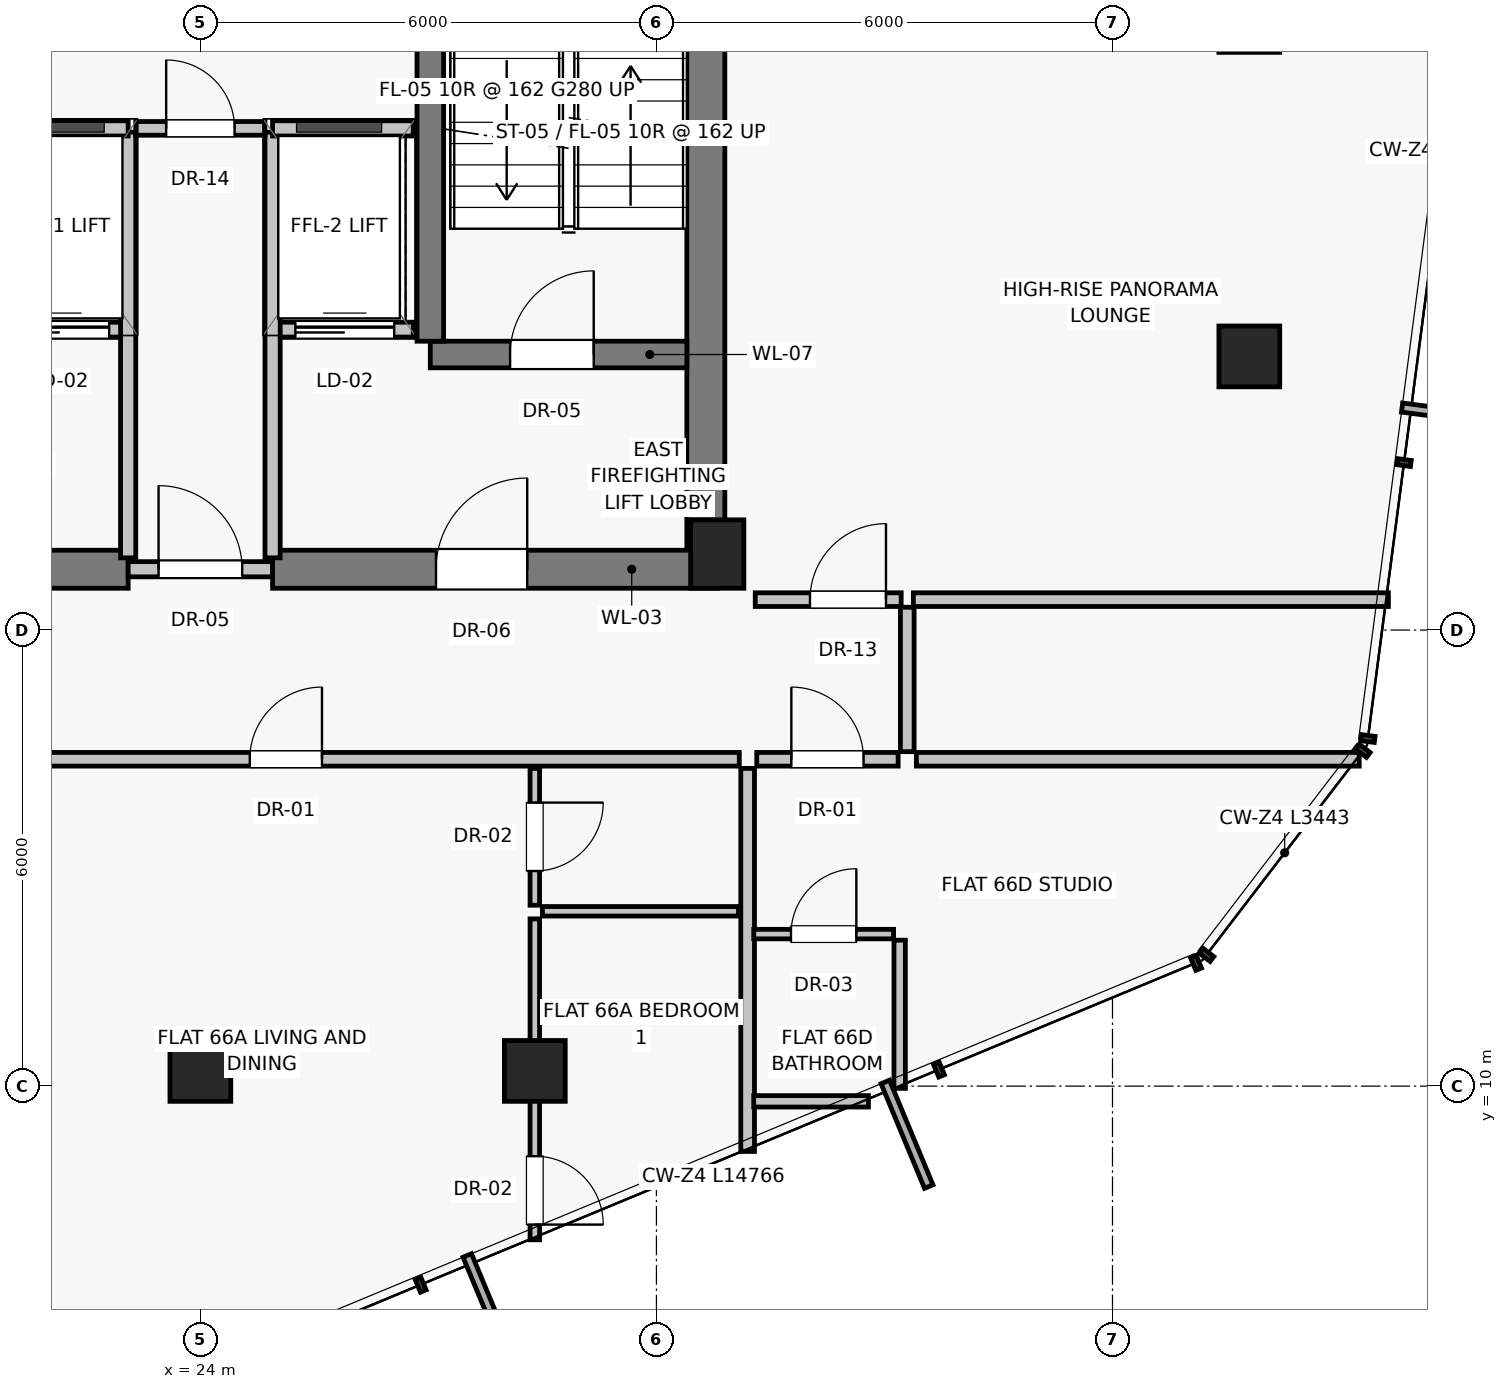
"""IFC4 building model, lengths in metres.
Left out: names, types, materials, properties, quantities, classifications, styles, units other than length and angle.
Written with IfcOpenShell. Run it as: python <this file> out.ifc"""

import sys

from ifc_helpers import new_model, si_unit, direction, frame, frame_2d, origin, origin_2d, place, context, subcontext, project, spatial, rectangle, extrude, source, transform, mapped, element, fill, save


model = new_model("IFC4")
c1 = context("Model", 3, precision=1e-05, world=origin(), true_north=direction((0.0, 1.0)))
c2 = subcontext(c1, "Body", "Model", "MODEL_VIEW")
j1 = project(units=[si_unit("LENGTHUNIT", "METRE"), si_unit("PLANEANGLEUNIT", "RADIAN")], contexts=[c1])
p1 = place(None, origin())
s1 = spatial("IfcSite", under=j1, at=p1, CompositionType="ELEMENT")
p2 = place(p1, origin())
s2 = spatial("IfcBuilding", under=s1, at=p2, CompositionType="ELEMENT")
p3 = place(p2, frame((0.0, 0.0, 233.3)))
s3 = spatial("IfcBuildingStorey", under=s2, at=p3, CompositionType="ELEMENT", Elevation=233.3)
p4 = place(p3, frame((30.8, 17.0, 0.0), z_axis=(0.0, 0.0, 1.0), x_axis=(1.0, 0.0, 0.0)))
e1 = element("IfcColumn", 1, at=p4, inside=s3, PredefinedType="PILASTER", context=c2, shape_type="SweptSolid", body=[
    extrude(rectangle(XDim=0.7, YDim=0.9, at=origin_2d()), origin(), (0.0, 0.0, 1.0), 3.25),
])
for number, where, z_axis, x_axis in (
    (2, (37.8, 19.6, 0.0), (0.0, 0.0, 1.0), (1.0, 0.0, 0.0)),
    (3, (37.8, 24.0, 0.0), (0.0, 0.0, 1.0), (1.0, 0.0, 0.0)),
    (4, (24.0, 10.2, 0.0), (0.0, 0.0, 1.0), (1.0, 0.0, 0.0)),
    (5, (28.4, 10.2, 0.0), (0.0, 0.0, 1.0), (1.0, 0.0, 0.0)),
):
    element("IfcColumn", number, at=place(p3, frame(where, z_axis=z_axis, x_axis=x_axis)), inside=s3, PredefinedType="COLUMN", context=c2, shape_type="SweptSolid", body=[
        extrude(rectangle(XDim=0.8, YDim=0.8, at=origin_2d()), origin(), (0.0, 0.0, 1.0), 3.25),
    ])
p5 = place(p3, frame((30.65, 16.8, 0.0), z_axis=(0.0, 0.0, 1.0), x_axis=(0.0, 1.0, 0.0)))
e6 = element("IfcWall", 6, at=p5, inside=s3, PredefinedType="SHEAR", context=c2, shape_type="SweptSolid", body=[
    extrude(rectangle(XDim=14.2, YDim=0.5, at=frame_2d((7.1, 0.0))), origin(), (0.0, 0.0, 1.0), 3.015),
])
p6 = place(p3, frame((17.2, 16.8, 0.0), z_axis=(0.0, 0.0, 1.0), x_axis=(1.0, 0.0, 0.0)))
e7 = element("IfcWall", 7, at=p6, inside=s3, PredefinedType="SHEAR", context=c2, shape_type="SweptSolid", body=[
    extrude(rectangle(XDim=5.85, YDim=0.5, at=frame_2d((2.925, 0.0))), origin(), (0.0, 0.0, 1.0), 3.015),
])
p7 = place(p6, frame((1.15, 0.0, 0.0)))
e8 = element("IfcOpeningElement", 8, at=p7, cuts=e7, PredefinedType="OPENING", context=c2, shape_type="SweptSolid", body=[
    extrude(rectangle(XDim=1.2, YDim=2.03, at=frame_2d((0.6, 1.015))), frame((0.0, 0.26, 0.0), z_axis=(0.0, -1.0, 0.0), x_axis=(1.0, 0.0, 0.0)), (0.0, 0.0, 1.0), 0.52),
])
p8 = place(p3, frame((23.05, 16.8, 0.0), z_axis=(0.0, 0.0, 1.0), x_axis=(1.0, 0.0, 0.0)))
e9 = element("IfcWall", 9, at=p8, inside=s3, PredefinedType="SOLIDWALL", context=c2, shape_type="SweptSolid", body=[
    extrude(rectangle(XDim=1.9, YDim=0.2, at=frame_2d((0.95, 0.0))), origin(), (0.0, 0.0, 1.0), 2.165),
])
p9 = place(p8, frame((0.4, 0.0, 0.0)))
e10 = element("IfcOpeningElement", 10, at=p9, cuts=e9, PredefinedType="OPENING", context=c2, shape_type="SweptSolid", body=[
    extrude(rectangle(XDim=1.1, YDim=2.03, at=frame_2d((0.55, 1.015))), frame((0.0, 0.11, 0.0), z_axis=(0.0, -1.0, 0.0), x_axis=(1.0, 0.0, 0.0)), (0.0, 0.0, 1.0), 0.22),
])
p10 = place(p3, frame((24.95, 16.8, 0.0), z_axis=(0.0, 0.0, 1.0), x_axis=(1.0, 0.0, 0.0)))
e11 = element("IfcWall", 11, at=p10, inside=s3, PredefinedType="SHEAR", context=c2, shape_type="SweptSolid", body=[
    extrude(rectangle(XDim=5.85, YDim=0.5, at=frame_2d((2.925, 0.0))), origin(), (0.0, 0.0, 1.0), 3.015),
])
p11 = place(p10, frame((2.15, 0.0, 0.0)))
e12 = element("IfcOpeningElement", 12, at=p11, cuts=e11, PredefinedType="OPENING", context=c2, shape_type="SweptSolid", body=[
    extrude(rectangle(XDim=1.2, YDim=2.03, at=frame_2d((0.6, 1.015))), frame((0.0, 0.26, 0.0), z_axis=(0.0, -1.0, 0.0), x_axis=(1.0, 0.0, 0.0)), (0.0, 0.0, 1.0), 0.52),
])
p12 = place(p3, frame((21.2, 19.95, 0.0), z_axis=(0.0, 0.0, 1.0), x_axis=(1.0, 0.0, 0.0)))
e13 = element("IfcWall", 13, at=p12, inside=s3, PredefinedType="SOLIDWALL", context=c2, shape_type="SweptSolid", body=[
    extrude(rectangle(XDim=1.85, YDim=0.2, at=frame_2d((0.925, 0.0))), origin(), (0.0, 0.0, 1.0), 3.015),
])
p13 = place(p12, frame((0.3, 0.0, 0.0)))
e14 = element("IfcOpeningElement", 14, at=p13, cuts=e13, PredefinedType="OPENING", context=c2, shape_type="SweptSolid", body=[
    extrude(rectangle(XDim=1.3, YDim=2.25, at=frame_2d((0.65, 1.125))), frame((0.0, 0.11, 0.0), z_axis=(0.0, -1.0, 0.0), x_axis=(1.0, 0.0, 0.0)), (0.0, 0.0, 1.0), 0.22),
])
p14 = place(p3, frame((24.95, 19.95, 0.0), z_axis=(0.0, 0.0, 1.0), x_axis=(1.0, 0.0, 0.0)))
e15 = element("IfcWall", 15, at=p14, inside=s3, PredefinedType="SOLIDWALL", context=c2, shape_type="SweptSolid", body=[
    extrude(rectangle(XDim=1.85, YDim=0.2, at=frame_2d((0.925, 0.0))), origin(), (0.0, 0.0, 1.0), 3.015),
])
p15 = place(p14, frame((0.3, 0.0, 0.0)))
e16 = element("IfcOpeningElement", 16, at=p15, cuts=e15, PredefinedType="OPENING", context=c2, shape_type="SweptSolid", body=[
    extrude(rectangle(XDim=1.3, YDim=2.25, at=frame_2d((0.65, 1.125))), frame((0.0, 0.11, 0.0), z_axis=(0.0, -1.0, 0.0), x_axis=(1.0, 0.0, 0.0)), (0.0, 0.0, 1.0), 0.22),
])
p16 = place(p3, frame((27.025, 19.625, 0.0), z_axis=(0.0, 0.0, 1.0), x_axis=(1.0, 0.0, 0.0)))
e17 = element("IfcWall", 17, at=p16, inside=s3, PredefinedType="SHEAR", context=c2, shape_type="SweptSolid", body=[
    extrude(rectangle(XDim=3.375, YDim=0.35, at=frame_2d((1.688, 0.0))), origin(), (0.0, 0.0, 1.0), 3.015),
])
p17 = place(p16, frame((1.05, 0.0, 0.0)))
e18 = element("IfcOpeningElement", 18, at=p17, cuts=e17, PredefinedType="OPENING", context=c2, shape_type="SweptSolid", body=[
    extrude(rectangle(XDim=1.1, YDim=2.03, at=frame_2d((0.55, 1.015))), frame((0.0, 0.185, 0.0), z_axis=(0.0, -1.0, 0.0), x_axis=(1.0, 0.0, 0.0)), (0.0, 0.0, 1.0), 0.37),
])
p18 = place(p3, frame((27.025, 19.8, 0.0), z_axis=(0.0, 0.0, 1.0), x_axis=(0.0, 1.0, 0.0)))
e19 = element("IfcWall", 19, at=p18, inside=s3, PredefinedType="SHEAR", context=c2, shape_type="SweptSolid", body=[
    extrude(rectangle(XDim=8.775, YDim=0.35, at=frame_2d((4.387, 0.0))), origin(), (0.0, 0.0, 1.0), 3.015),
])
for number, where, z_axis, x_axis in (
    (20, (23.05, 16.95, 0.0), (0.0, 0.0, 1.0), (0.0, 1.0, 0.0)),
    (21, (24.95, 16.95, 0.0), (0.0, 0.0, 1.0), (0.0, 1.0, 0.0)),
):
    element("IfcWall", number, at=place(p3, frame(where, z_axis=z_axis, x_axis=x_axis)), inside=s3, PredefinedType="SOLIDWALL", context=c2, shape_type="SweptSolid", body=[
        extrude(rectangle(XDim=5.6, YDim=0.2, at=frame_2d((2.8, 0.0))), origin(), (0.0, 0.0, 1.0), 3.015),
    ])
for number, where, z_axis, x_axis in (
    (22, (21.2, 22.6, 0.0), (0.0, 0.0, 1.0), (1.0, 0.0, 0.0)),
    (23, (24.95, 22.6, 0.0), (0.0, 0.0, 1.0), (1.0, 0.0, 0.0)),
):
    element("IfcWall", number, at=place(p3, frame(where, z_axis=z_axis, x_axis=x_axis)), inside=s3, PredefinedType="SOLIDWALL", context=c2, shape_type="SweptSolid", body=[
        extrude(rectangle(XDim=1.85, YDim=0.2, at=frame_2d((0.925, 0.0))), origin(), (0.0, 0.0, 1.0), 3.015),
    ])
p19 = place(p3, frame((23.15, 22.6, 0.0), z_axis=(0.0, 0.0, 1.0), x_axis=(1.0, 0.0, 0.0)))
e24 = element("IfcWall", 24, at=p19, inside=s3, PredefinedType="PARTITIONING", context=c2, shape_type="SweptSolid", body=[
    extrude(rectangle(XDim=1.7, YDim=0.18, at=frame_2d((0.85, 0.0))), origin(), (0.0, 0.0, 1.0), 3.015),
])
p20 = place(p19, frame((0.4, 0.0, 0.0)))
e25 = element("IfcOpeningElement", 25, at=p20, cuts=e24, PredefinedType="OPENING", context=c2, shape_type="SweptSolid", body=[
    extrude(rectangle(XDim=0.9, YDim=2.01, at=frame_2d((0.45, 1.005))), frame((0.0, 0.1, 0.0), z_axis=(0.0, -1.0, 0.0), x_axis=(1.0, 0.0, 0.0)), (0.0, 0.0, 1.0), 0.2),
])
p21 = place(p3, frame((31.2, 14.18, 0.0), z_axis=(0.0, 0.0, 1.0), x_axis=(0.0, -1.0, 0.0)))
e26 = element("IfcWall", 26, at=p21, inside=s3, PredefinedType="PARTITIONING", context=c2, shape_type="SweptSolid", body=[
    extrude(rectangle(XDim=5.04, YDim=0.18, at=frame_2d((2.52, 0.0))), origin(), (0.0, 0.0, 1.0), 3.015),
])
p22 = place(p3, frame((19.71, 14.3, 0.0), z_axis=(0.0, 0.0, 1.0), x_axis=(1.0, 0.0, 0.0)))
e27 = element("IfcWall", 27, at=p22, inside=s3, PredefinedType="PARTITIONING", context=c2, shape_type="SweptSolid", body=[
    extrude(rectangle(XDim=11.38, YDim=0.18, at=frame_2d((5.69, 0.0))), origin(), (0.0, 0.0, 1.0), 3.015),
])
p23 = place(p22, frame((4.94, 0.0, 0.0)))
e28 = element("IfcOpeningElement", 28, at=p23, cuts=e27, PredefinedType="OPENING", context=c2, shape_type="SweptSolid", body=[
    extrude(rectangle(XDim=0.95, YDim=2.02, at=frame_2d((0.475, 1.01))), frame((0.0, 0.1, 0.0), z_axis=(0.0, -1.0, 0.0), x_axis=(1.0, 0.0, 0.0)), (0.0, 0.0, 1.0), 0.2),
])
p24 = place(p3, frame((28.4, 14.18, 0.0), z_axis=(0.0, 0.0, 1.0), x_axis=(0.0, -1.0, 0.0)))
e29 = element("IfcWall", 29, at=p24, inside=s3, PredefinedType="PARTITIONING", context=c2, shape_type="SweptSolid", body=[
    extrude(rectangle(XDim=1.8, YDim=0.125, at=frame_2d((0.9, 0.0))), origin(), (0.0, 0.0, 1.0), 3.015),
])
p25 = place(p24, frame((0.45, 0.0, 0.0)))
e30 = element("IfcOpeningElement", 30, at=p25, cuts=e29, PredefinedType="OPENING", context=c2, shape_type="SweptSolid", body=[
    extrude(rectangle(XDim=0.9, YDim=2.01, at=frame_2d((0.45, 1.005))), frame((0.0, 0.073, 0.0), z_axis=(0.0, -1.0, 0.0), x_axis=(1.0, 0.0, 0.0)), (0.0, 0.0, 1.0), 0.145),
])
p26 = place(p3, frame((28.5, 12.3, 0.0), z_axis=(0.0, 0.0, 1.0), x_axis=(1.0, 0.0, 0.0)))
e31 = element("IfcWall", 31, at=p26, inside=s3, PredefinedType="PARTITIONING", context=c2, shape_type="SweptSolid", body=[
    extrude(rectangle(XDim=2.58, YDim=0.125, at=frame_2d((1.29, 0.0))), origin(), (0.0, 0.0, 1.0), 3.015),
])
p27 = place(p3, frame((28.4, 12.2, 0.0), z_axis=(0.0, 0.0, 1.0), x_axis=(0.0, -1.0, 0.0)))
e32 = element("IfcWall", 32, at=p27, inside=s3, PredefinedType="PARTITIONING", context=c2, shape_type="SweptSolid", body=[
    extrude(rectangle(XDim=4.222, YDim=0.125, at=frame_2d((2.111, 0.0))), origin(), (0.0, 0.0, 1.0), 3.015),
])
p28 = place(p27, frame((3.122, 0.0, 0.0)))
e33 = element("IfcOpeningElement", 33, at=p28, cuts=e32, PredefinedType="OPENING", context=c2, shape_type="SweptSolid", body=[
    extrude(rectangle(XDim=0.9, YDim=2.01, at=frame_2d((0.45, 1.005))), frame((0.0, 0.073, 0.0), z_axis=(0.0, -1.0, 0.0), x_axis=(1.0, 0.0, 0.0)), (0.0, 0.0, 1.0), 0.145),
])
p29 = place(p3, frame((33.3, 14.4, 0.0), z_axis=(0.0, 0.0, 1.0), x_axis=(0.0, 1.0, 0.0)))
e34 = element("IfcWall", 34, at=p29, inside=s3, PredefinedType="PARTITIONING", context=c2, shape_type="SweptSolid", body=[
    extrude(rectangle(XDim=1.9, YDim=0.18, at=frame_2d((0.95, 0.0))), origin(), (0.0, 0.0, 1.0), 3.015),
])
p30 = place(p3, frame((31.3, 16.4, 0.0), z_axis=(0.0, 0.0, 1.0), x_axis=(1.0, 0.0, 0.0)))
e35 = element("IfcWall", 35, at=p30, inside=s3, PredefinedType="PARTITIONING", context=c2, shape_type="SweptSolid", body=[
    extrude(rectangle(XDim=1.92, YDim=0.18, at=frame_2d((0.96, 0.0))), origin(), (0.0, 0.0, 1.0), 3.015),
])
p31 = place(p30, frame((0.72, 0.0, 0.0)))
e36 = element("IfcOpeningElement", 36, at=p31, cuts=e35, PredefinedType="OPENING", context=c2, shape_type="SweptSolid", body=[
    extrude(rectangle(XDim=1.0, YDim=2.01, at=frame_2d((0.5, 1.005))), frame((0.0, 0.1, 0.0), z_axis=(0.0, -1.0, 0.0), x_axis=(1.0, 0.0, 0.0)), (0.0, 0.0, 1.0), 0.2),
])
p32 = place(p3, frame((33.38, 16.4, 0.0), z_axis=(0.0, 0.0, 1.0), x_axis=(1.0, 0.0, 0.0)))
e37 = element("IfcWall", 37, at=p32, inside=s3, PredefinedType="PARTITIONING", context=c2, shape_type="SweptSolid", body=[
    extrude(rectangle(XDim=6.25, YDim=0.18, at=frame_2d((3.125, 0.0))), origin(), (0.0, 0.0, 1.0), 3.015),
])
p33 = place(p3, frame((33.42, 14.3, 0.0), z_axis=(0.0, 0.0, 1.0), x_axis=(1.0, 0.0, 0.0)))
e38 = element("IfcWall", 38, at=p33, inside=s3, PredefinedType="PARTITIONING", context=c2, shape_type="SweptSolid", body=[
    extrude(rectangle(XDim=5.826, YDim=0.18, at=frame_2d((2.913, 0.0))), origin(), (0.0, 0.0, 1.0), 3.015),
])
p34 = place(p3, frame((31.32, 14.3, 0.0), z_axis=(0.0, 0.0, 1.0), x_axis=(1.0, 0.0, 0.0)))
e39 = element("IfcWall", 39, at=p34, inside=s3, PredefinedType="PARTITIONING", context=c2, shape_type="SweptSolid", body=[
    extrude(rectangle(XDim=1.86, YDim=0.18, at=frame_2d((0.93, 0.0))), origin(), (0.0, 0.0, 1.0), 3.015),
])
p35 = place(p34, frame((0.455, 0.0, 0.0)))
e40 = element("IfcOpeningElement", 40, at=p35, cuts=e39, PredefinedType="OPENING", context=c2, shape_type="SweptSolid", body=[
    extrude(rectangle(XDim=0.95, YDim=2.02, at=frame_2d((0.475, 1.01))), frame((0.0, 0.1, 0.0), z_axis=(0.0, -1.0, 0.0), x_axis=(1.0, 0.0, 0.0)), (0.0, 0.0, 1.0), 0.2),
])
p36 = place(p3, frame((31.28, 12.0, 0.0), z_axis=(0.0, 0.0, 1.0), x_axis=(1.0, 0.0, 0.0)))
e41 = element("IfcWall", 41, at=p36, inside=s3, PredefinedType="PARTITIONING", context=c2, shape_type="SweptSolid", body=[
    extrude(rectangle(XDim=1.84, YDim=0.125, at=frame_2d((0.92, 0.0))), origin(), (0.0, 0.0, 1.0), 3.015),
])
p37 = place(p36, frame((0.49, 0.0, 0.0)))
e42 = element("IfcOpeningElement", 42, at=p37, cuts=e41, PredefinedType="OPENING", context=c2, shape_type="SweptSolid", body=[
    extrude(rectangle(XDim=0.86, YDim=2.01, at=frame_2d((0.43, 1.005))), frame((0.0, 0.073, 0.0), z_axis=(0.0, -1.0, 0.0), x_axis=(1.0, 0.0, 0.0)), (0.0, 0.0, 1.0), 0.145),
])
p38 = place(p3, frame((31.28, 9.8, 0.0), z_axis=(0.0, 0.0, 1.0), x_axis=(1.0, 0.0, 0.0)))
e43 = element("IfcWall", 43, at=p38, inside=s3, PredefinedType="PARTITIONING", context=c2, shape_type="SweptSolid", body=[
    extrude(rectangle(XDim=1.509, YDim=0.15, at=frame_2d((0.755, 0.0))), origin(), (0.0, 0.0, 1.0), 3.015),
])
p39 = place(p3, frame((33.2, 9.97, 0.0), z_axis=(0.0, 0.0, 1.0), x_axis=(0.0, 1.0, 0.0)))
e44 = element("IfcWall", 44, at=p39, inside=s3, PredefinedType="PARTITIONING", context=c2, shape_type="SweptSolid", body=[
    extrude(rectangle(XDim=1.949, YDim=0.15, at=frame_2d((0.975, 0.0))), origin(), (0.0, 0.0, 1.0), 3.015),
])
m1 = source(origin(), c2, "Body", "SweptSolid", [
    extrude(rectangle(XDim=1.1, YDim=2.03, at=frame_2d((0.55, 1.015))), frame((0.0, 0.025, 0.0), z_axis=(0.0, -1.0, 0.0), x_axis=(1.0, 0.0, 0.0)), (0.0, 0.0, 1.0), 0.05),
])
p40 = place(p9, origin())
e45 = element("IfcDoor", 45, at=p40, inside=s3, OperationType="SINGLE_SWING_LEFT", PredefinedType="DOOR", context=c2, shape_type="MappedRepresentation", body=[
    mapped(m1, transform((0.0, 0.0, 0.0), scale=1.0)),
])
fill(e10, e45)
m2 = source(origin(), c2, "Body", "SweptSolid", [
    extrude(rectangle(XDim=1.2, YDim=2.03, at=frame_2d((0.6, 1.015))), frame((0.0, 0.025, 0.0), z_axis=(0.0, -1.0, 0.0), x_axis=(1.0, 0.0, 0.0)), (0.0, 0.0, 1.0), 0.05),
])
p41 = place(p11, origin())
e46 = element("IfcDoor", 46, at=p41, inside=s3, OperationType="SINGLE_SWING_RIGHT", PredefinedType="DOOR", context=c2, shape_type="MappedRepresentation", body=[
    mapped(m2, transform((0.0, 0.0, 0.0), scale=1.0)),
])
fill(e12, e46)
m3 = source(origin(), c2, "Body", "SweptSolid", [
    extrude(rectangle(XDim=1.3, YDim=2.25, at=frame_2d((0.65, 1.125))), frame((0.0, 0.025, 0.0), z_axis=(0.0, -1.0, 0.0), x_axis=(1.0, 0.0, 0.0)), (0.0, 0.0, 1.0), 0.05),
])
p42 = place(p13, origin())
e47 = element("IfcDoor", 47, at=p42, inside=s3, OperationType="SLIDING_TO_LEFT", PredefinedType="DOOR", context=c2, shape_type="MappedRepresentation", body=[
    mapped(m3, transform((0.0, 0.0, 0.0), scale=1.0)),
])
fill(e14, e47)
p43 = place(p15, origin())
e48 = element("IfcDoor", 48, at=p43, inside=s3, OperationType="SLIDING_TO_LEFT", PredefinedType="DOOR", context=c2, shape_type="MappedRepresentation", body=[
    mapped(m3, transform((0.0, 0.0, 0.0), scale=1.0)),
])
fill(e16, e48)
p44 = place(p17, origin())
e49 = element("IfcDoor", 49, at=p44, inside=s3, OperationType="SINGLE_SWING_RIGHT", PredefinedType="DOOR", context=c2, shape_type="MappedRepresentation", body=[
    mapped(m1, transform((0.0, 0.0, 0.0), scale=1.0)),
])
fill(e18, e49)
m4 = source(origin(), c2, "Body", "SweptSolid", [
    extrude(rectangle(XDim=0.9, YDim=2.01, at=frame_2d((0.45, 1.005))), frame((0.0, 0.025, 0.0), z_axis=(0.0, -1.0, 0.0), x_axis=(1.0, 0.0, 0.0)), (0.0, 0.0, 1.0), 0.05),
])
p45 = place(p20, origin())
e50 = element("IfcDoor", 50, at=p45, inside=s3, OperationType="SINGLE_SWING_LEFT", PredefinedType="DOOR", context=c2, shape_type="MappedRepresentation", body=[
    mapped(m4, transform((0.0, 0.0, 0.0), scale=1.0)),
])
fill(e25, e50)
m5 = source(origin(), c2, "Body", "SweptSolid", [
    extrude(rectangle(XDim=0.95, YDim=2.02, at=frame_2d((0.475, 1.01))), frame((0.0, 0.025, 0.0), z_axis=(0.0, -1.0, 0.0), x_axis=(1.0, 0.0, 0.0)), (0.0, 0.0, 1.0), 0.05),
])
p46 = place(p23, origin())
e51 = element("IfcDoor", 51, at=p46, inside=s3, OperationType="SINGLE_SWING_RIGHT", PredefinedType="DOOR", context=c2, shape_type="MappedRepresentation", body=[
    mapped(m5, transform((0.0, 0.0, 0.0), scale=1.0)),
])
fill(e28, e51)
p47 = place(p25, origin())
e52 = element("IfcDoor", 52, at=p47, inside=s3, OperationType="SINGLE_SWING_LEFT", PredefinedType="DOOR", context=c2, shape_type="MappedRepresentation", body=[
    mapped(m4, transform((0.0, 0.0, 0.0), scale=1.0)),
])
fill(e30, e52)
p48 = place(p28, origin())
e53 = element("IfcDoor", 53, at=p48, inside=s3, OperationType="SINGLE_SWING_RIGHT", PredefinedType="DOOR", context=c2, shape_type="MappedRepresentation", body=[
    mapped(m4, transform((0.0, 0.0, 0.0), scale=1.0)),
])
fill(e33, e53)
m6 = source(origin(), c2, "Body", "SweptSolid", [
    extrude(rectangle(XDim=1.0, YDim=2.01, at=frame_2d((0.5, 1.005))), frame((0.0, 0.025, 0.0), z_axis=(0.0, -1.0, 0.0), x_axis=(1.0, 0.0, 0.0)), (0.0, 0.0, 1.0), 0.05),
])
p49 = place(p31, origin())
e54 = element("IfcDoor", 54, at=p49, inside=s3, OperationType="SINGLE_SWING_RIGHT", PredefinedType="DOOR", context=c2, shape_type="MappedRepresentation", body=[
    mapped(m6, transform((0.0, 0.0, 0.0), scale=1.0)),
])
fill(e36, e54)
p50 = place(p35, origin())
e55 = element("IfcDoor", 55, at=p50, inside=s3, OperationType="SINGLE_SWING_LEFT", PredefinedType="DOOR", context=c2, shape_type="MappedRepresentation", body=[
    mapped(m5, transform((0.0, 0.0, 0.0), scale=1.0)),
])
fill(e40, e55)
m7 = source(origin(), c2, "Body", "SweptSolid", [
    extrude(rectangle(XDim=0.86, YDim=2.01, at=frame_2d((0.43, 1.005))), frame((0.0, 0.025, 0.0), z_axis=(0.0, -1.0, 0.0), x_axis=(1.0, 0.0, 0.0)), (0.0, 0.0, 1.0), 0.05),
])
p51 = place(p37, origin())
e56 = element("IfcDoor", 56, at=p51, inside=s3, OperationType="SINGLE_SWING_RIGHT", PredefinedType="DOOR", context=c2, shape_type="MappedRepresentation", body=[
    mapped(m7, transform((0.0, 0.0, 0.0), scale=1.0)),
])
fill(e42, e56)
save(model, sys.argv[1])
